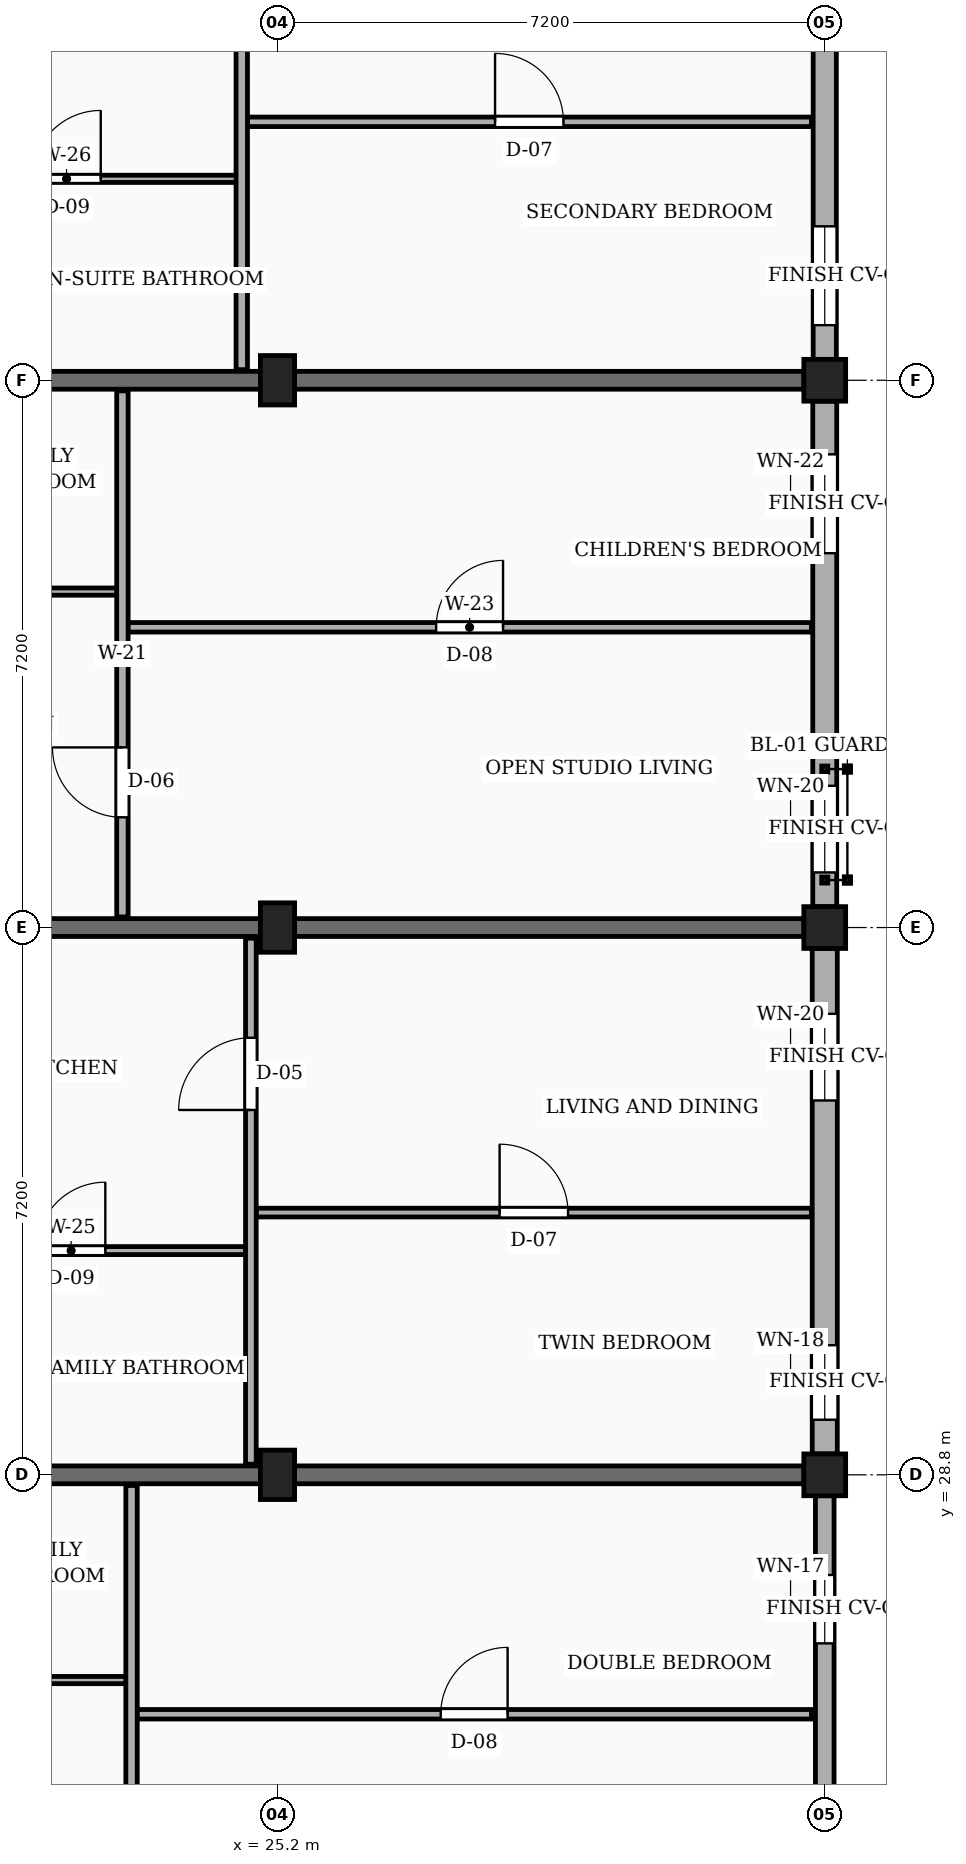
"""IFC4 building model, lengths in metres.
Left out: names, types, materials, properties, quantities, classifications, styles, units other than length and angle.
Written with IfcOpenShell. Run it as: python <this file> out.ifc"""

import sys

from ifc_helpers import new_model, si_unit, direction, frame, frame_2d, origin, origin_2d, place, context, subcontext, project, spatial, rectangle, extrude, element, fill, save


model = new_model("IFC4")
c1 = context("Model", 3, precision=1e-05, world=origin(), true_north=direction((0.0, 1.0)))
c2 = subcontext(c1, "Body", "Model", "MODEL_VIEW")
j1 = project(units=[si_unit("LENGTHUNIT", "METRE"), si_unit("PLANEANGLEUNIT", "RADIAN")], contexts=[c1])
p1 = place(None, origin())
s1 = spatial("IfcSite", under=j1, at=p1, CompositionType="ELEMENT")
p2 = place(p1, origin())
s2 = spatial("IfcBuilding", under=s1, at=p2, CompositionType="ELEMENT")
p3 = place(p2, frame((0.0, 0.0, 13.95)))
s3 = spatial("IfcBuildingStorey", under=s2, at=p3, CompositionType="ELEMENT", Elevation=13.95)
for number, where, z_axis, x_axis in (
    (1, (25.2, 28.8, 0.0), (0.0, 0.0, 1.0), (1.0, 0.0, 0.0)),
    (2, (25.2, 36.0, 0.0), (0.0, 0.0, 1.0), (1.0, 0.0, 0.0)),
    (3, (25.2, 43.2, 0.0), (0.0, 0.0, 1.0), (1.0, 0.0, 0.0)),
):
    element("IfcColumn", number, at=place(p3, frame(where, z_axis=z_axis, x_axis=x_axis)), inside=s3, PredefinedType="COLUMN", context=c2, shape_type="SweptSolid", body=[
        extrude(rectangle(XDim=0.45, YDim=0.65, at=origin_2d()), origin(), (0.0, 0.0, 1.0), 3.15),
    ])
for number, where, z_axis, x_axis in (
    (4, (32.4, 28.8, 0.0), (0.0, 0.0, 1.0), (1.0, 0.0, 0.0)),
    (5, (32.4, 36.0, 0.0), (0.0, 0.0, 1.0), (1.0, 0.0, 0.0)),
    (6, (32.4, 43.2, 0.0), (0.0, 0.0, 1.0), (1.0, 0.0, 0.0)),
):
    element("IfcColumn", number, at=place(p3, frame(where, z_axis=z_axis, x_axis=x_axis)), inside=s3, PredefinedType="COLUMN", context=c2, shape_type="SweptSolid", body=[
        extrude(rectangle(XDim=0.55, YDim=0.55, at=origin_2d()), origin(), (0.0, 0.0, 1.0), 3.15),
    ])
for number, where, z_axis, x_axis in (
    (7, (20.1, 28.8, 0.0), (0.0, 0.0, 1.0), (1.0, 0.0, 0.0)),
    (8, (20.1, 36.0, 0.0), (0.0, 0.0, 1.0), (1.0, 0.0, 0.0)),
    (9, (20.1, 43.2, 0.0), (0.0, 0.0, 1.0), (1.0, 0.0, 0.0)),
):
    element("IfcWall", number, at=place(p3, frame(where, z_axis=z_axis, x_axis=x_axis)), inside=s3, PredefinedType="SOLIDWALL", context=c2, shape_type="SweptSolid", body=[
        extrude(rectangle(XDim=12.025, YDim=0.235, at=frame_2d((6.012, 0.0))), origin(), (0.0, 0.0, 1.0), 2.17),
    ])
p4 = place(p3, frame((32.4, 24.62, 0.0), z_axis=(0.0, 0.0, 1.0), x_axis=(0.0, 1.0, 0.0)))
e10 = element("IfcWall", 10, at=p4, inside=s3, PredefinedType="SOLIDWALL", context=c2, shape_type="SweptSolid", body=[
    extrude(rectangle(XDim=3.905, YDim=0.245, at=frame_2d((1.952, 0.0))), origin(), (0.0, 0.0, 1.0), 2.44),
])
p5 = place(p4, frame((1.962, 0.0, 0.78)))
e11 = element("IfcOpeningElement", 11, at=p5, cuts=e10, PredefinedType="OPENING", context=c2, shape_type="SweptSolid", body=[
    extrude(rectangle(XDim=0.9, YDim=1.36, at=frame_2d((0.45, 0.68))), frame((0.0, 0.133, 0.0), z_axis=(0.0, -1.0, 0.0), x_axis=(1.0, 0.0, 0.0)), (0.0, 0.0, 1.0), 0.265),
])
p6 = place(p3, frame((32.4, 29.075, 0.0), z_axis=(0.0, 0.0, 1.0), x_axis=(0.0, 1.0, 0.0)))
e12 = element("IfcWall", 12, at=p6, inside=s3, PredefinedType="SOLIDWALL", context=c2, shape_type="SweptSolid", body=[
    extrude(rectangle(XDim=6.65, YDim=0.33, at=frame_2d((3.325, 0.0))), origin(), (0.0, 0.0, 1.0), 2.44),
])
p7 = place(p6, frame((0.45, 0.0, 0.78)))
e13 = element("IfcOpeningElement", 13, at=p7, cuts=e12, PredefinedType="OPENING", context=c2, shape_type="SweptSolid", body=[
    extrude(rectangle(XDim=0.98, YDim=1.36, at=frame_2d((0.49, 0.68))), frame((0.0, 0.175, 0.0), z_axis=(0.0, -1.0, 0.0), x_axis=(1.0, 0.0, 0.0)), (0.0, 0.0, 1.0), 0.35),
])
p8 = place(p6, frame((4.65, 0.0, 0.78)))
e14 = element("IfcOpeningElement", 14, at=p8, cuts=e12, PredefinedType="OPENING", context=c2, shape_type="SweptSolid", body=[
    extrude(rectangle(XDim=1.14, YDim=1.36, at=frame_2d((0.57, 0.68))), frame((0.0, 0.175, 0.0), z_axis=(0.0, -1.0, 0.0), x_axis=(1.0, 0.0, 0.0)), (0.0, 0.0, 1.0), 0.35),
])
p9 = place(p3, frame((32.4, 36.275, 0.0), z_axis=(0.0, 0.0, 1.0), x_axis=(0.0, 1.0, 0.0)))
e15 = element("IfcWall", 15, at=p9, inside=s3, PredefinedType="SOLIDWALL", context=c2, shape_type="SweptSolid", body=[
    extrude(rectangle(XDim=6.65, YDim=0.315, at=frame_2d((3.325, 0.0))), origin(), (0.0, 0.0, 1.0), 2.44),
])
p10 = place(p9, frame((0.45, 0.0, 0.78)))
e16 = element("IfcOpeningElement", 16, at=p10, cuts=e15, PredefinedType="OPENING", context=c2, shape_type="SweptSolid", body=[
    extrude(rectangle(XDim=1.14, YDim=1.36, at=frame_2d((0.57, 0.68))), frame((0.0, 0.167, 0.0), z_axis=(0.0, -1.0, 0.0), x_axis=(1.0, 0.0, 0.0)), (0.0, 0.0, 1.0), 0.335),
])
p11 = place(p9, frame((4.65, 0.0, 0.78)))
e17 = element("IfcOpeningElement", 17, at=p11, cuts=e15, PredefinedType="OPENING", context=c2, shape_type="SweptSolid", body=[
    extrude(rectangle(XDim=1.3, YDim=1.36, at=frame_2d((0.65, 0.68))), frame((0.0, 0.167, 0.0), z_axis=(0.0, -1.0, 0.0), x_axis=(1.0, 0.0, 0.0)), (0.0, 0.0, 1.0), 0.335),
])
p12 = place(p3, frame((32.4, 43.475, 0.0), z_axis=(0.0, 0.0, 1.0), x_axis=(0.0, 1.0, 0.0)))
e18 = element("IfcWall", 18, at=p12, inside=s3, PredefinedType="SOLIDWALL", context=c2, shape_type="SweptSolid", body=[
    extrude(rectangle(XDim=6.65, YDim=0.305, at=frame_2d((3.325, 0.0))), origin(), (0.0, 0.0, 1.0), 2.44),
])
p13 = place(p12, frame((0.45, 0.0, 0.78)))
e19 = element("IfcOpeningElement", 19, at=p13, cuts=e18, PredefinedType="OPENING", context=c2, shape_type="SweptSolid", body=[
    extrude(rectangle(XDim=1.3, YDim=1.36, at=frame_2d((0.65, 0.68))), frame((0.0, 0.163, 0.0), z_axis=(0.0, -1.0, 0.0), x_axis=(1.0, 0.0, 0.0)), (0.0, 0.0, 1.0), 0.325),
])
p14 = place(p12, frame((4.65, 0.0, 0.78)))
e20 = element("IfcOpeningElement", 20, at=p14, cuts=e18, PredefinedType="OPENING", context=c2, shape_type="SweptSolid", body=[
    extrude(rectangle(XDim=1.46, YDim=1.36, at=frame_2d((0.73, 0.68))), frame((0.0, 0.163, 0.0), z_axis=(0.0, -1.0, 0.0), x_axis=(1.0, 0.0, 0.0)), (0.0, 0.0, 1.0), 0.325),
])
p15 = place(p3, frame((23.35, 25.65, 0.0), z_axis=(0.0, 0.0, 1.0), x_axis=(1.0, 0.0, 0.0)))
e21 = element("IfcWall", 21, at=p15, inside=s3, PredefinedType="PARTITIONING", context=c2, shape_type="SweptSolid", body=[
    extrude(rectangle(XDim=8.875, YDim=0.125, at=frame_2d((4.438, 0.0))), origin(), (0.0, 0.0, 1.0), 2.305),
])
p16 = place(p15, frame((3.998, 0.0, 0.0)))
e22 = element("IfcOpeningElement", 22, at=p16, cuts=e21, PredefinedType="OPENING", context=c2, shape_type="SweptSolid", body=[
    extrude(rectangle(XDim=0.88, YDim=2.08, at=frame_2d((0.44, 1.04))), frame((0.0, 0.073, 0.0), z_axis=(0.0, -1.0, 0.0), x_axis=(1.0, 0.0, 0.0)), (0.0, 0.0, 1.0), 0.145),
])
p17 = place(p3, frame((20.19, 26.1, 0.0), z_axis=(0.0, 0.0, 1.0), x_axis=(1.0, 0.0, 0.0)))
e23 = element("IfcWall", 23, at=p17, inside=s3, PredefinedType="PARTITIONING", context=c2, shape_type="SweptSolid", body=[
    extrude(rectangle(XDim=3.02, YDim=0.095, at=frame_2d((1.51, 0.0))), origin(), (0.0, 0.0, 1.0), 2.305),
])
p18 = place(p17, frame((1.075, 0.0, 0.0)))
e24 = element("IfcOpeningElement", 24, at=p18, cuts=e23, PredefinedType="OPENING", context=c2, shape_type="SweptSolid", body=[
    extrude(rectangle(XDim=0.87, YDim=2.05, at=frame_2d((0.435, 1.025))), frame((0.0, 0.058, 0.0), z_axis=(0.0, -1.0, 0.0), x_axis=(1.0, 0.0, 0.0)), (0.0, 0.0, 1.0), 0.115),
])
p19 = place(p3, frame((23.28, 21.74, 0.0), z_axis=(0.0, 0.0, 1.0), x_axis=(0.0, 1.0, 0.0)))
e25 = element("IfcWall", 25, at=p19, inside=s3, PredefinedType="PARTITIONING", context=c2, shape_type="SweptSolid", body=[
    extrude(rectangle(XDim=6.92, YDim=0.15, at=frame_2d((3.46, 0.0))), origin(), (0.0, 0.0, 1.0), 2.305),
])
p20 = place(p19, frame((1.31, 0.0, 0.0)))
e26 = element("IfcOpeningElement", 26, at=p20, cuts=e25, PredefinedType="OPENING", context=c2, shape_type="SweptSolid", body=[
    extrude(rectangle(XDim=0.92, YDim=2.1, at=frame_2d((0.46, 1.05))), frame((0.0, 0.085, 0.0), z_axis=(0.0, -1.0, 0.0), x_axis=(1.0, 0.0, 0.0)), (0.0, 0.0, 1.0), 0.17),
])
p21 = place(p3, frame((24.92, 32.25, 0.0), z_axis=(0.0, 0.0, 1.0), x_axis=(1.0, 0.0, 0.0)))
e27 = element("IfcWall", 27, at=p21, inside=s3, PredefinedType="PARTITIONING", context=c2, shape_type="SweptSolid", body=[
    extrude(rectangle(XDim=7.305, YDim=0.115, at=frame_2d((3.653, 0.0))), origin(), (0.0, 0.0, 1.0), 2.305),
])
p22 = place(p21, frame((3.202, 0.0, 0.0)))
e28 = element("IfcOpeningElement", 28, at=p22, cuts=e27, PredefinedType="OPENING", context=c2, shape_type="SweptSolid", body=[
    extrude(rectangle(XDim=0.9, YDim=2.1, at=frame_2d((0.45, 1.05))), frame((0.0, 0.067, 0.0), z_axis=(0.0, -1.0, 0.0), x_axis=(1.0, 0.0, 0.0)), (0.0, 0.0, 1.0), 0.135),
])
p23 = place(p3, frame((20.19, 31.75, 0.0), z_axis=(0.0, 0.0, 1.0), x_axis=(1.0, 0.0, 0.0)))
e29 = element("IfcWall", 29, at=p23, inside=s3, PredefinedType="PARTITIONING", context=c2, shape_type="SweptSolid", body=[
    extrude(rectangle(XDim=4.59, YDim=0.105, at=frame_2d((2.295, 0.0))), origin(), (0.0, 0.0, 1.0), 2.305),
])
p24 = place(p23, frame((1.845, 0.0, 0.0)))
e30 = element("IfcOpeningElement", 30, at=p24, cuts=e29, PredefinedType="OPENING", context=c2, shape_type="SweptSolid", body=[
    extrude(rectangle(XDim=0.9, YDim=2.05, at=frame_2d((0.45, 1.025))), frame((0.0, 0.062, 0.0), z_axis=(0.0, -1.0, 0.0), x_axis=(1.0, 0.0, 0.0)), (0.0, 0.0, 1.0), 0.125),
])
p25 = place(p3, frame((24.85, 28.94, 0.0), z_axis=(0.0, 0.0, 1.0), x_axis=(0.0, 1.0, 0.0)))
e31 = element("IfcWall", 31, at=p25, inside=s3, PredefinedType="PARTITIONING", context=c2, shape_type="SweptSolid", body=[
    extrude(rectangle(XDim=6.92, YDim=0.14, at=frame_2d((3.46, 0.0))), origin(), (0.0, 0.0, 1.0), 2.305),
])
p26 = place(p25, frame((4.66, 0.0, 0.0)))
e32 = element("IfcOpeningElement", 32, at=p26, cuts=e31, PredefinedType="OPENING", context=c2, shape_type="SweptSolid", body=[
    extrude(rectangle(XDim=0.95, YDim=2.1, at=frame_2d((0.475, 1.05))), frame((0.0, 0.08, 0.0), z_axis=(0.0, -1.0, 0.0), x_axis=(1.0, 0.0, 0.0)), (0.0, 0.0, 1.0), 0.16),
])
p27 = place(p3, frame((23.23, 39.95, 0.0), z_axis=(0.0, 0.0, 1.0), x_axis=(1.0, 0.0, 0.0)))
e33 = element("IfcWall", 33, at=p27, inside=s3, PredefinedType="PARTITIONING", context=c2, shape_type="SweptSolid", body=[
    extrude(rectangle(XDim=8.995, YDim=0.125, at=frame_2d((4.498, 0.0))), origin(), (0.0, 0.0, 1.0), 2.305),
])
p28 = place(p27, frame((4.058, 0.0, 0.0)))
e34 = element("IfcOpeningElement", 34, at=p28, cuts=e33, PredefinedType="OPENING", context=c2, shape_type="SweptSolid", body=[
    extrude(rectangle(XDim=0.88, YDim=2.08, at=frame_2d((0.44, 1.04))), frame((0.0, 0.073, 0.0), z_axis=(0.0, -1.0, 0.0), x_axis=(1.0, 0.0, 0.0)), (0.0, 0.0, 1.0), 0.145),
])
p29 = place(p3, frame((20.19, 40.42, 0.0), z_axis=(0.0, 0.0, 1.0), x_axis=(1.0, 0.0, 0.0)))
e35 = element("IfcWall", 35, at=p29, inside=s3, PredefinedType="PARTITIONING", context=c2, shape_type="SweptSolid", body=[
    extrude(rectangle(XDim=2.9, YDim=0.095, at=frame_2d((1.45, 0.0))), origin(), (0.0, 0.0, 1.0), 2.305),
])
p30 = place(p29, frame((1.015, 0.0, 0.0)))
e36 = element("IfcOpeningElement", 36, at=p30, cuts=e35, PredefinedType="OPENING", context=c2, shape_type="SweptSolid", body=[
    extrude(rectangle(XDim=0.87, YDim=2.05, at=frame_2d((0.435, 1.025))), frame((0.0, 0.058, 0.0), z_axis=(0.0, -1.0, 0.0), x_axis=(1.0, 0.0, 0.0)), (0.0, 0.0, 1.0), 0.115),
])
p31 = place(p3, frame((23.16, 36.14, 0.0), z_axis=(0.0, 0.0, 1.0), x_axis=(0.0, 1.0, 0.0)))
e37 = element("IfcWall", 37, at=p31, inside=s3, PredefinedType="PARTITIONING", context=c2, shape_type="SweptSolid", body=[
    extrude(rectangle(XDim=6.92, YDim=0.15, at=frame_2d((3.46, 0.0))), origin(), (0.0, 0.0, 1.0), 2.305),
])
p32 = place(p31, frame((1.31, 0.0, 0.0)))
e38 = element("IfcOpeningElement", 38, at=p32, cuts=e37, PredefinedType="OPENING", context=c2, shape_type="SweptSolid", body=[
    extrude(rectangle(XDim=0.92, YDim=2.1, at=frame_2d((0.46, 1.05))), frame((0.0, 0.085, 0.0), z_axis=(0.0, -1.0, 0.0), x_axis=(1.0, 0.0, 0.0)), (0.0, 0.0, 1.0), 0.17),
])
p33 = place(p3, frame((24.8, 46.6, 0.0), z_axis=(0.0, 0.0, 1.0), x_axis=(1.0, 0.0, 0.0)))
e39 = element("IfcWall", 39, at=p33, inside=s3, PredefinedType="PARTITIONING", context=c2, shape_type="SweptSolid", body=[
    extrude(rectangle(XDim=7.425, YDim=0.125, at=frame_2d((3.712, 0.0))), origin(), (0.0, 0.0, 1.0), 2.305),
])
p34 = place(p33, frame((3.262, 0.0, 0.0)))
e40 = element("IfcOpeningElement", 40, at=p34, cuts=e39, PredefinedType="OPENING", context=c2, shape_type="SweptSolid", body=[
    extrude(rectangle(XDim=0.9, YDim=2.1, at=frame_2d((0.45, 1.05))), frame((0.0, 0.073, 0.0), z_axis=(0.0, -1.0, 0.0), x_axis=(1.0, 0.0, 0.0)), (0.0, 0.0, 1.0), 0.145),
])
p35 = place(p3, frame((20.19, 45.85, 0.0), z_axis=(0.0, 0.0, 1.0), x_axis=(1.0, 0.0, 0.0)))
e41 = element("IfcWall", 41, at=p35, inside=s3, PredefinedType="PARTITIONING", context=c2, shape_type="SweptSolid", body=[
    extrude(rectangle(XDim=4.47, YDim=0.095, at=frame_2d((2.235, 0.0))), origin(), (0.0, 0.0, 1.0), 2.305),
])
p36 = place(p35, frame((1.785, 0.0, 0.0)))
e42 = element("IfcOpeningElement", 42, at=p36, cuts=e41, PredefinedType="OPENING", context=c2, shape_type="SweptSolid", body=[
    extrude(rectangle(XDim=0.9, YDim=2.05, at=frame_2d((0.45, 1.025))), frame((0.0, 0.058, 0.0), z_axis=(0.0, -1.0, 0.0), x_axis=(1.0, 0.0, 0.0)), (0.0, 0.0, 1.0), 0.115),
])
p37 = place(p3, frame((24.73, 43.34, 0.0), z_axis=(0.0, 0.0, 1.0), x_axis=(0.0, 1.0, 0.0)))
e43 = element("IfcWall", 43, at=p37, inside=s3, PredefinedType="PARTITIONING", context=c2, shape_type="SweptSolid", body=[
    extrude(rectangle(XDim=6.885, YDim=0.15, at=frame_2d((3.442, 0.0))), origin(), (0.0, 0.0, 1.0), 2.305),
])
p38 = place(p37, frame((4.66, 0.0, 0.0)))
e44 = element("IfcOpeningElement", 44, at=p38, cuts=e43, PredefinedType="OPENING", context=c2, shape_type="SweptSolid", body=[
    extrude(rectangle(XDim=0.95, YDim=2.1, at=frame_2d((0.475, 1.05))), frame((0.0, 0.085, 0.0), z_axis=(0.0, -1.0, 0.0), x_axis=(1.0, 0.0, 0.0)), (0.0, 0.0, 1.0), 0.17),
])
p39 = place(p5, origin())
e45 = element("IfcWindow", 45, at=p39, inside=s3, PartitioningType="SINGLE_PANEL", PredefinedType="WINDOW", context=c2, shape_type="SweptSolid", body=[
    extrude(rectangle(XDim=0.9, YDim=1.36, at=frame_2d((0.45, 0.68))), frame((0.0, 0.03, 0.0), z_axis=(0.0, -1.0, 0.0), x_axis=(1.0, 0.0, 0.0)), (0.0, 0.0, 1.0), 0.06),
])
fill(e11, e45)
p40 = place(p7, origin())
e46 = element("IfcWindow", 46, at=p40, inside=s3, PartitioningType="SINGLE_PANEL", PredefinedType="WINDOW", context=c2, shape_type="SweptSolid", body=[
    extrude(rectangle(XDim=0.98, YDim=1.36, at=frame_2d((0.49, 0.68))), frame((0.0, 0.03, 0.0), z_axis=(0.0, -1.0, 0.0), x_axis=(1.0, 0.0, 0.0)), (0.0, 0.0, 1.0), 0.06),
])
fill(e13, e46)
p41 = place(p8, origin())
e47 = element("IfcWindow", 47, at=p41, inside=s3, PartitioningType="SINGLE_PANEL", PredefinedType="WINDOW", context=c2, shape_type="SweptSolid", body=[
    extrude(rectangle(XDim=1.14, YDim=1.36, at=frame_2d((0.57, 0.68))), frame((0.0, 0.03, 0.0), z_axis=(0.0, -1.0, 0.0), x_axis=(1.0, 0.0, 0.0)), (0.0, 0.0, 1.0), 0.06),
])
fill(e14, e47)
p42 = place(p10, origin())
e48 = element("IfcWindow", 48, at=p42, inside=s3, PartitioningType="SINGLE_PANEL", PredefinedType="WINDOW", context=c2, shape_type="SweptSolid", body=[
    extrude(rectangle(XDim=1.14, YDim=1.36, at=frame_2d((0.57, 0.68))), frame((0.0, 0.03, 0.0), z_axis=(0.0, -1.0, 0.0), x_axis=(1.0, 0.0, 0.0)), (0.0, 0.0, 1.0), 0.06),
])
fill(e16, e48)
p43 = place(p11, origin())
e49 = element("IfcWindow", 49, at=p43, inside=s3, PartitioningType="SINGLE_PANEL", PredefinedType="WINDOW", context=c2, shape_type="SweptSolid", body=[
    extrude(rectangle(XDim=1.3, YDim=1.36, at=frame_2d((0.65, 0.68))), frame((0.0, 0.03, 0.0), z_axis=(0.0, -1.0, 0.0), x_axis=(1.0, 0.0, 0.0)), (0.0, 0.0, 1.0), 0.06),
])
fill(e17, e49)
p44 = place(p13, origin())
e50 = element("IfcWindow", 50, at=p44, inside=s3, PartitioningType="SINGLE_PANEL", PredefinedType="WINDOW", context=c2, shape_type="SweptSolid", body=[
    extrude(rectangle(XDim=1.3, YDim=1.36, at=frame_2d((0.65, 0.68))), frame((0.0, 0.03, 0.0), z_axis=(0.0, -1.0, 0.0), x_axis=(1.0, 0.0, 0.0)), (0.0, 0.0, 1.0), 0.06),
])
fill(e19, e50)
p45 = place(p16, origin())
e51 = element("IfcDoor", 51, at=p45, inside=s3, OperationType="SINGLE_SWING_RIGHT", PredefinedType="DOOR", context=c2, shape_type="SweptSolid", body=[
    extrude(rectangle(XDim=0.88, YDim=2.08, at=frame_2d((0.44, 1.04))), frame((0.0, 0.025, 0.0), z_axis=(0.0, -1.0, 0.0), x_axis=(1.0, 0.0, 0.0)), (0.0, 0.0, 1.0), 0.05),
])
fill(e22, e51)
p46 = place(p22, origin())
e52 = element("IfcDoor", 52, at=p46, inside=s3, OperationType="SINGLE_SWING_LEFT", PredefinedType="DOOR", context=c2, shape_type="SweptSolid", body=[
    extrude(rectangle(XDim=0.9, YDim=2.1, at=frame_2d((0.45, 1.05))), frame((0.0, 0.025, 0.0), z_axis=(0.0, -1.0, 0.0), x_axis=(1.0, 0.0, 0.0)), (0.0, 0.0, 1.0), 0.05),
])
fill(e28, e52)
p47 = place(p24, origin())
e53 = element("IfcDoor", 53, at=p47, inside=s3, OperationType="SINGLE_SWING_RIGHT", PredefinedType="DOOR", context=c2, shape_type="SweptSolid", body=[
    extrude(rectangle(XDim=0.9, YDim=2.05, at=frame_2d((0.45, 1.025))), frame((0.0, 0.025, 0.0), z_axis=(0.0, -1.0, 0.0), x_axis=(1.0, 0.0, 0.0)), (0.0, 0.0, 1.0), 0.05),
])
fill(e30, e53)
p48 = place(p26, origin())
e54 = element("IfcDoor", 54, at=p48, inside=s3, OperationType="SINGLE_SWING_LEFT", PredefinedType="DOOR", context=c2, shape_type="SweptSolid", body=[
    extrude(rectangle(XDim=0.95, YDim=2.1, at=frame_2d((0.475, 1.05))), frame((0.0, 0.025, 0.0), z_axis=(0.0, -1.0, 0.0), x_axis=(1.0, 0.0, 0.0)), (0.0, 0.0, 1.0), 0.05),
])
fill(e32, e54)
p49 = place(p28, origin())
e55 = element("IfcDoor", 55, at=p49, inside=s3, OperationType="SINGLE_SWING_RIGHT", PredefinedType="DOOR", context=c2, shape_type="SweptSolid", body=[
    extrude(rectangle(XDim=0.88, YDim=2.08, at=frame_2d((0.44, 1.04))), frame((0.0, 0.025, 0.0), z_axis=(0.0, -1.0, 0.0), x_axis=(1.0, 0.0, 0.0)), (0.0, 0.0, 1.0), 0.05),
])
fill(e34, e55)
p50 = place(p32, origin())
e56 = element("IfcDoor", 56, at=p50, inside=s3, OperationType="SINGLE_SWING_RIGHT", PredefinedType="DOOR", context=c2, shape_type="SweptSolid", body=[
    extrude(rectangle(XDim=0.92, YDim=2.1, at=frame_2d((0.46, 1.05))), frame((0.0, 0.025, 0.0), z_axis=(0.0, -1.0, 0.0), x_axis=(1.0, 0.0, 0.0)), (0.0, 0.0, 1.0), 0.05),
])
fill(e38, e56)
p51 = place(p34, origin())
e57 = element("IfcDoor", 57, at=p51, inside=s3, OperationType="SINGLE_SWING_LEFT", PredefinedType="DOOR", context=c2, shape_type="SweptSolid", body=[
    extrude(rectangle(XDim=0.9, YDim=2.1, at=frame_2d((0.45, 1.05))), frame((0.0, 0.025, 0.0), z_axis=(0.0, -1.0, 0.0), x_axis=(1.0, 0.0, 0.0)), (0.0, 0.0, 1.0), 0.05),
])
fill(e40, e57)
p52 = place(p36, origin())
e58 = element("IfcDoor", 58, at=p52, inside=s3, OperationType="SINGLE_SWING_RIGHT", PredefinedType="DOOR", context=c2, shape_type="SweptSolid", body=[
    extrude(rectangle(XDim=0.9, YDim=2.05, at=frame_2d((0.45, 1.025))), frame((0.0, 0.025, 0.0), z_axis=(0.0, -1.0, 0.0), x_axis=(1.0, 0.0, 0.0)), (0.0, 0.0, 1.0), 0.05),
])
fill(e42, e58)
save(model, sys.argv[1])
